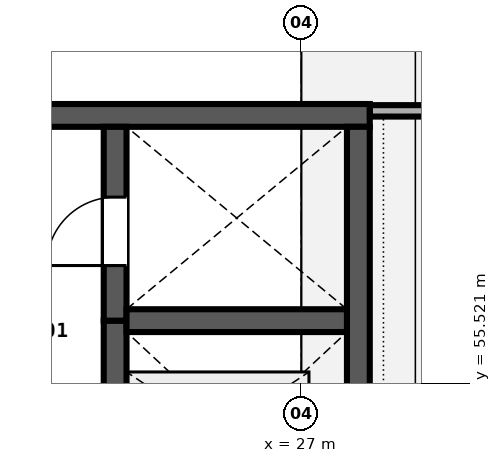
"""IFC4 building model, lengths in metres.
Left out: names, types, materials, properties, quantities, classifications, styles, units other than length and angle.
Written with IfcOpenShell. Run it as: python <this file> out.ifc"""

import sys

from ifc_helpers import new_model, si_unit, direction, frame, frame_2d, origin, place, context, subcontext, project, spatial, rectangle, extrude, element, fill, save


model = new_model("IFC4")
c1 = context("Model", 3, precision=1e-05, world=origin(), true_north=direction((0.0, 1.0)))
c2 = subcontext(c1, "Body", "Model", "MODEL_VIEW")
j1 = project(units=[si_unit("LENGTHUNIT", "METRE"), si_unit("PLANEANGLEUNIT", "RADIAN")], contexts=[c1])
p1 = place(None, origin())
s1 = spatial("IfcSite", under=j1, at=p1, CompositionType="ELEMENT")
p2 = place(p1, origin())
s2 = spatial("IfcBuilding", under=s1, at=p2, CompositionType="ELEMENT")
p3 = place(p2, frame((0.0, 0.0, 19.2)))
s3 = spatial("IfcBuildingStorey", under=s2, at=p3, CompositionType="ELEMENT", Elevation=19.2)
p4 = place(p3, frame((27.9, 59.05, 0.0), z_axis=(0.0, 0.0, 1.0), x_axis=(-1.0, 0.0, 0.0)))
e1 = element("IfcWall", 1, at=p4, inside=s3, PredefinedType="SHEAR", context=c2, shape_type="SweptSolid", body=[
    extrude(rectangle(XDim=18.0, YDim=0.3, at=frame_2d((9.0, 0.0))), origin(), (0.0, 0.0, 1.0), 4.55),
])
p5 = place(p4, frame((4.7, 0.0, 0.0)))
e2 = element("IfcOpeningElement", 2, at=p5, cuts=e1, PredefinedType="OPENING", context=c2, shape_type="SweptSolid", body=[
    extrude(rectangle(XDim=1.9, YDim=2.25, at=frame_2d((0.95, 1.125))), frame((0.0, 0.16, 0.0), z_axis=(0.0, -1.0, 0.0), x_axis=(1.0, 0.0, 0.0)), (0.0, 0.0, 1.0), 0.32),
])
p6 = place(p3, frame((27.75, 53.5, 0.0), z_axis=(0.0, 0.0, 1.0), x_axis=(0.0, 1.0, 0.0)))
e3 = element("IfcWall", 3, at=p6, inside=s3, PredefinedType="SHEAR", context=c2, shape_type="SweptSolid", body=[
    extrude(rectangle(XDim=5.4, YDim=0.3, at=frame_2d((2.7, 0.0))), origin(), (0.0, 0.0, 1.0), 4.55),
])
p7 = place(p3, frame((24.55, 53.5, 0.0), z_axis=(0.0, 0.0, 1.0), x_axis=(0.0, 1.0, 0.0)))
e4 = element("IfcWall", 4, at=p7, inside=s3, PredefinedType="SHEAR", context=c2, shape_type="SweptSolid", body=[
    extrude(rectangle(XDim=2.85, YDim=0.3, at=frame_2d((1.425, 0.0))), origin(), (0.0, 0.0, 1.0), 4.55),
])
p8 = place(p7, frame((0.775, 0.0, 0.0)))
e5 = element("IfcOpeningElement", 5, at=p8, cuts=e4, PredefinedType="OPENING", context=c2, shape_type="SweptSolid", body=[
    extrude(rectangle(XDim=1.1, YDim=2.1, at=frame_2d((0.55, 1.05))), frame((0.0, 0.16, 0.0), z_axis=(0.0, -1.0, 0.0), x_axis=(1.0, 0.0, 0.0)), (0.0, 0.0, 1.0), 0.32),
])
p9 = place(p3, frame((24.55, 56.35, 0.0), z_axis=(0.0, 0.0, 1.0), x_axis=(0.0, 1.0, 0.0)))
e6 = element("IfcWall", 6, at=p9, inside=s3, PredefinedType="SHEAR", context=c2, shape_type="SweptSolid", body=[
    extrude(rectangle(XDim=2.55, YDim=0.3, at=frame_2d((1.275, 0.0))), origin(), (0.0, 0.0, 1.0), 4.55),
])
p10 = place(p9, frame((0.725, 0.0, 0.0)))
e7 = element("IfcOpeningElement", 7, at=p10, cuts=e6, PredefinedType="OPENING", context=c2, shape_type="SweptSolid", body=[
    extrude(rectangle(XDim=0.9, YDim=2.1, at=frame_2d((0.45, 1.05))), frame((0.0, 0.16, 0.0), z_axis=(0.0, -1.0, 0.0), x_axis=(1.0, 0.0, 0.0)), (0.0, 0.0, 1.0), 0.32),
])
p11 = place(p3, frame((24.7, 56.35, 0.0), z_axis=(0.0, 0.0, 1.0), x_axis=(1.0, 0.0, 0.0)))
e8 = element("IfcWall", 8, at=p11, inside=s3, PredefinedType="SHEAR", context=c2, shape_type="SweptSolid", body=[
    extrude(rectangle(XDim=2.9, YDim=0.3, at=frame_2d((1.45, 0.0))), origin(), (0.0, 0.0, 1.0), 4.55),
])
p12 = place(p3, frame((27.902, 59.11, 0.0), z_axis=(0.0, 0.0, 1.0), x_axis=(1.0, 0.0, 0.0)))
e9 = element("IfcWall", 9, at=p12, inside=s3, PredefinedType="PARTITIONING", context=c2, shape_type="SweptSolid", body=[
    extrude(rectangle(XDim=2.038, YDim=0.15, at=frame_2d((1.019, 0.0))), origin(), (0.0, 0.0, 1.0), 3.28),
])
p13 = place(p10, origin())
e10 = element("IfcDoor", 10, at=p13, inside=s3, OperationType="SINGLE_SWING_LEFT", PredefinedType="DOOR", context=c2, shape_type="SweptSolid", body=[
    extrude(rectangle(XDim=0.9, YDim=2.1, at=frame_2d((0.45, 1.05))), frame((0.0, 0.025, 0.0), z_axis=(0.0, -1.0, 0.0), x_axis=(1.0, 0.0, 0.0)), (0.0, 0.0, 1.0), 0.05),
])
fill(e7, e10)
save(model, sys.argv[1])
